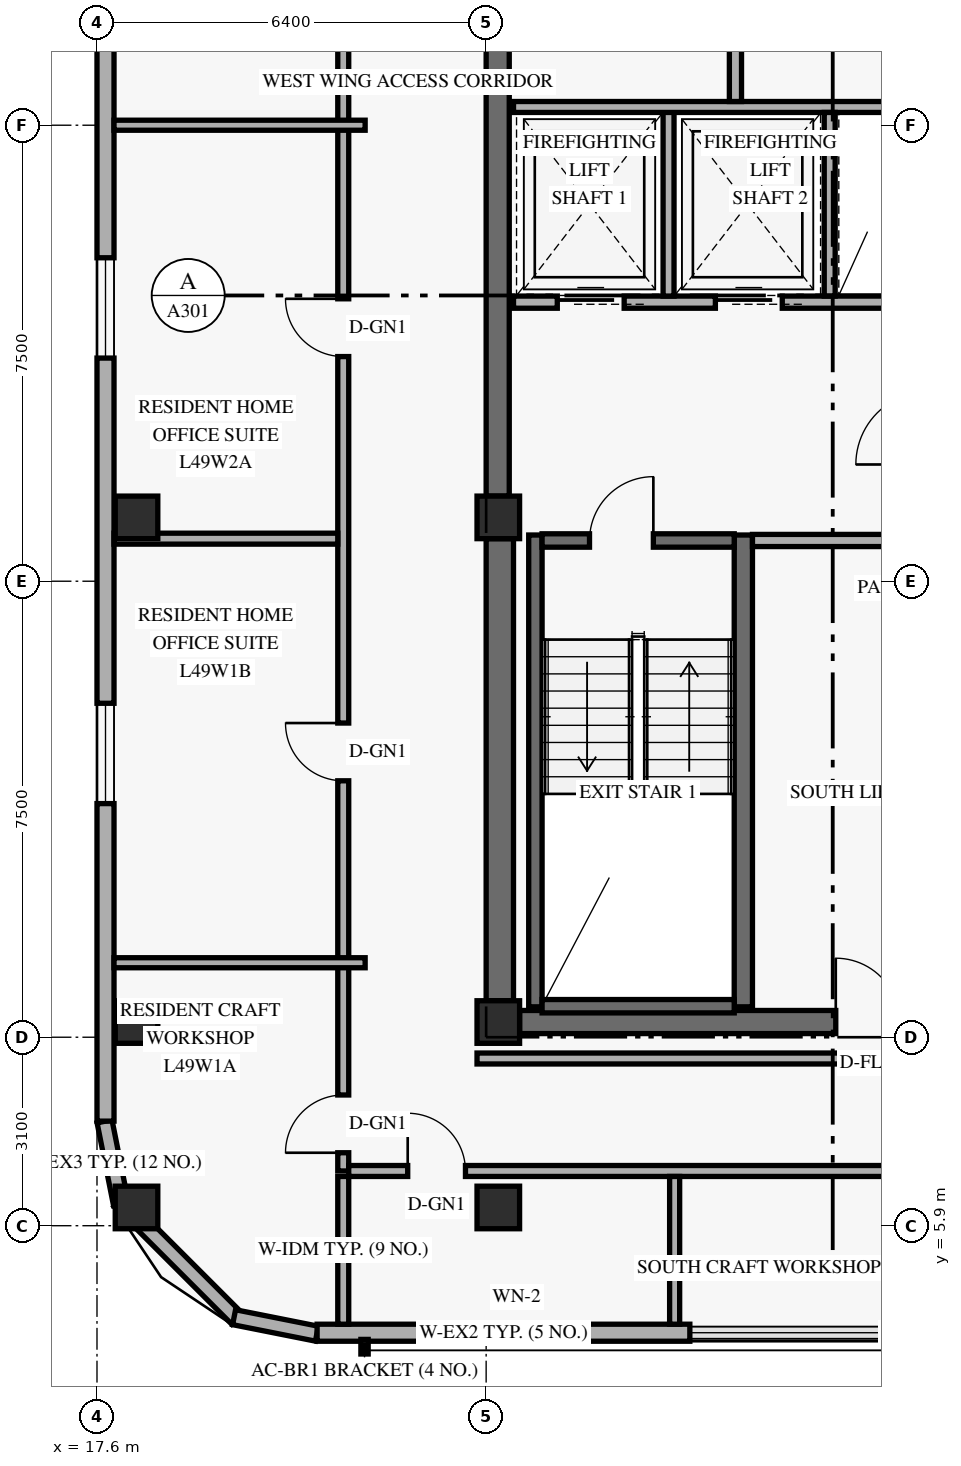
"""IFC4 building model, lengths in metres.
Left out: names, types, materials, properties, quantities, classifications, styles, units other than length and angle.
Written with IfcOpenShell. Run it as: python <this file> out.ifc"""

import sys

from ifc_helpers import new_model, si_unit, direction, frame, frame_2d, origin, origin_2d, place, context, subcontext, project, spatial, rectangle, extrude, element, fill, save


model = new_model("IFC4")
c1 = context("Model", 3, precision=1e-05, world=origin(), true_north=direction((0.0, 1.0)))
c2 = subcontext(c1, "Body", "Model", "MODEL_VIEW")
j1 = project(units=[si_unit("LENGTHUNIT", "METRE"), si_unit("PLANEANGLEUNIT", "RADIAN")], contexts=[c1])
p1 = place(None, origin())
s1 = spatial("IfcSite", under=j1, at=p1, CompositionType="ELEMENT")
p2 = place(p1, origin())
s2 = spatial("IfcBuilding", under=s1, at=p2, CompositionType="ELEMENT")
p3 = place(p2, frame((0.0, 0.0, 188.4)))
s3 = spatial("IfcBuildingStorey", under=s2, at=p3, CompositionType="ELEMENT", Elevation=188.4)
p4 = place(p3, frame((24.225, 9.6, 0.0), z_axis=(0.0, 0.0, 1.0), x_axis=(0.0, 1.0, 0.0)))
e1 = element("IfcWall", 1, at=p4, inside=s3, PredefinedType="SHEAR", context=c2, shape_type="SweptSolid", body=[
    extrude(rectangle(XDim=7.6, YDim=0.45, at=frame_2d((3.8, 0.0))), origin(), (0.0, 0.0, 1.0), 2.738),
])
p5 = place(p3, frame((24.19, 17.9, 0.0), z_axis=(0.0, 0.0, 1.0), x_axis=(0.0, 1.0, 0.0)))
e2 = element("IfcWall", 2, at=p5, inside=s3, PredefinedType="SHEAR", context=c2, shape_type="SweptSolid", body=[
    extrude(rectangle(XDim=11.95, YDim=0.38, at=frame_2d((5.975, 0.0))), origin(), (0.0, 0.0, 1.0), 2.738),
])
p6 = place(p3, frame((24.55, 9.25, 0.0), z_axis=(0.0, 0.0, 1.0), x_axis=(1.0, 0.0, 0.0)))
e3 = element("IfcWall", 3, at=p6, inside=s3, PredefinedType="SHEAR", context=c2, shape_type="SweptSolid", body=[
    extrude(rectangle(XDim=10.3, YDim=0.38, at=frame_2d((5.15, 0.0))), origin(), (0.0, 0.0, 1.0), 3.35),
])
p7 = place(p6, frame((5.2, 0.0, 0.0)))
e4 = element("IfcOpeningElement", 4, at=p7, cuts=e3, PredefinedType="OPENING", context=c2, shape_type="SweptSolid", body=[
    extrude(rectangle(XDim=1.05, YDim=2.15, at=frame_2d((0.525, 1.075))), frame((0.0, 0.2, 0.0), z_axis=(0.0, -1.0, 0.0), x_axis=(1.0, 0.0, 0.0)), (0.0, 0.0, 1.0), 0.4),
])
p8 = place(p3, frame((24.81, 9.5, 0.0), z_axis=(0.0, 0.0, 1.0), x_axis=(0.0, 1.0, 0.0)))
e5 = element("IfcWall", 5, at=p8, inside=s3, PredefinedType="SHEAR", context=c2, shape_type="SweptSolid", body=[
    extrude(rectangle(XDim=7.76, YDim=0.22, at=frame_2d((3.88, 0.0))), origin(), (0.0, 0.0, 1.0), 3.35),
])
p9 = place(p3, frame((28.23, 9.5, 0.0), z_axis=(0.0, 0.0, 1.0), x_axis=(0.0, 1.0, 0.0)))
e6 = element("IfcWall", 6, at=p9, inside=s3, PredefinedType="SHEAR", context=c2, shape_type="SweptSolid", body=[
    extrude(rectangle(XDim=7.76, YDim=0.3, at=frame_2d((3.88, 0.0))), origin(), (0.0, 0.0, 1.0), 3.35),
])
p10 = place(p3, frame((24.92, 9.51, 0.0), z_axis=(0.0, 0.0, 1.0), x_axis=(1.0, 0.0, 0.0)))
e7 = element("IfcWall", 7, at=p10, inside=s3, PredefinedType="SHEAR", context=c2, shape_type="SweptSolid", body=[
    extrude(rectangle(XDim=3.16, YDim=0.22, at=frame_2d((1.58, 0.0))), origin(), (0.0, 0.0, 1.0), 3.35),
])
p11 = place(p3, frame((24.92, 17.17, 0.0), z_axis=(0.0, 0.0, 1.0), x_axis=(1.0, 0.0, 0.0)))
e8 = element("IfcWall", 8, at=p11, inside=s3, PredefinedType="SHEAR", context=c2, shape_type="SweptSolid", body=[
    extrude(rectangle(XDim=3.16, YDim=0.22, at=frame_2d((1.58, 0.0))), origin(), (0.0, 0.0, 1.0), 3.35),
])
p12 = place(p11, frame((0.78, 0.0, 0.0)))
e9 = element("IfcOpeningElement", 9, at=p12, cuts=e8, PredefinedType="OPENING", context=c2, shape_type="SweptSolid", body=[
    extrude(rectangle(XDim=1.05, YDim=2.15, at=frame_2d((0.525, 1.075))), frame((0.0, 0.12, 0.0), z_axis=(0.0, -1.0, 0.0), x_axis=(1.0, 0.0, 0.0)), (0.0, 0.0, 1.0), 0.24),
])
for number, where, z_axis, x_axis in (
    (10, (18.25, 6.2, 0.0), (0.0, 0.0, 1.0), (1.0, 0.0, 0.0)),
    (11, (18.25, 9.25, 0.0), (0.0, 0.0, 1.0), (1.0, 0.0, 0.0)),
    (12, (18.25, 17.55, 0.0), (0.0, 0.0, 1.0), (1.0, 0.0, 0.0)),
    (13, (24.2, 6.2, 0.0), (0.0, 0.0, 1.0), (1.0, 0.0, 0.0)),
    (14, (24.2, 9.25, 0.0), (0.0, 0.0, 1.0), (1.0, 0.0, 0.0)),
    (15, (24.2, 17.55, 0.0), (0.0, 0.0, 1.0), (1.0, 0.0, 0.0)),
):
    element("IfcColumn", number, at=place(p3, frame(where, z_axis=z_axis, x_axis=x_axis)), inside=s3, PredefinedType="COLUMN", context=c2, shape_type="SweptSolid", body=[
        extrude(rectangle(XDim=0.7, YDim=0.7, at=origin_2d()), origin(), (0.0, 0.0, 1.0), 3.6),
    ])
p13 = place(p3, frame((17.724, 7.616, 0.0), z_axis=(0.0, 0.0, 1.0), x_axis=(0.195135625965, -0.9807762678, 0.0)))
e16 = element("IfcWall", 16, at=p13, inside=s3, PredefinedType="SOLIDWALL", context=c2, shape_type="SweptSolid", body=[
    extrude(rectangle(XDim=1.389, YDim=0.25, at=frame_2d((0.694, 0.0))), origin(), (0.0, 0.0, 1.0), 3.35),
])
p14 = place(p3, frame((17.968, 6.305, 0.0), z_axis=(0.0, 0.0, 1.0), x_axis=(0.707106781187, -0.707106781187, 0.0)))
e17 = element("IfcWall", 17, at=p14, inside=s3, PredefinedType="SOLIDWALL", context=c2, shape_type="SweptSolid", body=[
    extrude(rectangle(XDim=2.739, YDim=0.25, at=frame_2d((1.37, 0.0))), origin(), (0.0, 0.0, 1.0), 3.35),
])
p15 = place(p3, frame((19.854, 4.395, 0.0), z_axis=(0.0, 0.0, 1.0), x_axis=(0.980809899341, -0.19496651342, 0.0)))
e18 = element("IfcWall", 18, at=p15, inside=s3, PredefinedType="SOLIDWALL", context=c2, shape_type="SweptSolid", body=[
    extrude(rectangle(XDim=1.389, YDim=0.25, at=frame_2d((0.694, 0.0))), origin(), (0.0, 0.0, 1.0), 3.35),
])
p16 = place(p3, frame((21.22, 4.14, 0.0), z_axis=(0.0, 0.0, 1.0), x_axis=(1.0, 0.0, 0.0)))
e19 = element("IfcWall", 19, at=p16, inside=s3, PredefinedType="SOLIDWALL", context=c2, shape_type="SweptSolid", body=[
    extrude(rectangle(XDim=6.13, YDim=0.28, at=frame_2d((3.065, 0.0))), origin(), (0.0, 0.0, 1.0), 3.35),
])
p17 = place(p16, frame((2.53, 0.0, 0.85)))
e20 = element("IfcOpeningElement", 20, at=p17, cuts=e19, PredefinedType="OPENING", context=c2, shape_type="SweptSolid", body=[
    extrude(rectangle(XDim=1.5, YDim=1.55, at=frame_2d((0.75, 0.775))), frame((0.0, 0.15, 0.0), z_axis=(0.0, -1.0, 0.0), x_axis=(1.0, 0.0, 0.0)), (0.0, 0.0, 1.0), 0.3),
])
p18 = place(p3, frame((17.74, 40.38, 0.0), z_axis=(0.0, 0.0, 1.0), x_axis=(0.0, -1.0, 0.0)))
e21 = element("IfcWall", 21, at=p18, inside=s3, PredefinedType="SOLIDWALL", context=c2, shape_type="SweptSolid", body=[
    extrude(rectangle(XDim=32.76, YDim=0.28, at=frame_2d((16.38, 0.0))), origin(), (0.0, 0.0, 1.0), 3.35),
])
p19 = place(p18, frame((25.887, 0.0, 0.85)))
e22 = element("IfcOpeningElement", 22, at=p19, cuts=e21, PredefinedType="OPENING", context=c2, shape_type="SweptSolid", body=[
    extrude(rectangle(XDim=1.65, YDim=1.6, at=frame_2d((0.825, 0.8))), frame((0.0, 0.15, 0.0), z_axis=(0.0, -1.0, 0.0), x_axis=(1.0, 0.0, 0.0)), (0.0, 0.0, 1.0), 0.3),
])
p20 = place(p18, frame((18.56, 0.0, 0.85)))
e23 = element("IfcOpeningElement", 23, at=p20, cuts=e21, PredefinedType="OPENING", context=c2, shape_type="SweptSolid", body=[
    extrude(rectangle(XDim=1.65, YDim=1.6, at=frame_2d((0.825, 0.8))), frame((0.0, 0.15, 0.0), z_axis=(0.0, -1.0, 0.0), x_axis=(1.0, 0.0, 0.0)), (0.0, 0.0, 1.0), 0.3),
])
p21 = place(p18, frame((12.675, 0.0, 0.85)))
e24 = element("IfcOpeningElement", 24, at=p21, cuts=e21, PredefinedType="OPENING", context=c2, shape_type="SweptSolid", body=[
    extrude(rectangle(XDim=1.65, YDim=1.6, at=frame_2d((0.825, 0.8))), frame((0.0, 0.15, 0.0), z_axis=(0.0, -1.0, 0.0), x_axis=(1.0, 0.0, 0.0)), (0.0, 0.0, 1.0), 0.3),
])
p22 = place(p18, frame((5.268, 0.0, 0.85)))
e25 = element("IfcOpeningElement", 25, at=p22, cuts=e21, PredefinedType="OPENING", context=c2, shape_type="SweptSolid", body=[
    extrude(rectangle(XDim=1.65, YDim=1.6, at=frame_2d((0.825, 0.8))), frame((0.0, 0.15, 0.0), z_axis=(0.0, -1.0, 0.0), x_axis=(1.0, 0.0, 0.0)), (0.0, 0.0, 1.0), 0.3),
])
p23 = place(p3, frame((24.45, 21.09, 0.0), z_axis=(0.0, 0.0, 1.0), x_axis=(1.0, 0.0, 0.0)))
e26 = element("IfcWall", 26, at=p23, inside=s3, PredefinedType="STANDARD", context=c2, shape_type="SweptSolid", body=[
    extrude(rectangle(XDim=6.83, YDim=0.2, at=frame_2d((3.415, 0.0))), origin(), (0.0, 0.0, 1.0), 3.35),
])
p24 = place(p23, frame((0.72, 0.0, 0.0)))
e27 = element("IfcOpeningElement", 27, at=p24, cuts=e26, PredefinedType="OPENING", context=c2, shape_type="SweptSolid", body=[
    extrude(rectangle(XDim=1.1, YDim=2.2, at=frame_2d((0.55, 1.1))), frame((0.0, 0.11, 0.0), z_axis=(0.0, -1.0, 0.0), x_axis=(1.0, 0.0, 0.0)), (0.0, 0.0, 1.0), 0.22),
])
p25 = place(p23, frame((3.32, 0.0, 0.0)))
e28 = element("IfcOpeningElement", 28, at=p25, cuts=e26, PredefinedType="OPENING", context=c2, shape_type="SweptSolid", body=[
    extrude(rectangle(XDim=1.1, YDim=2.2, at=frame_2d((0.55, 1.1))), frame((0.0, 0.11, 0.0), z_axis=(0.0, -1.0, 0.0), x_axis=(1.0, 0.0, 0.0)), (0.0, 0.0, 1.0), 0.22),
])
p26 = place(p3, frame((28.38, 17.17, 0.0), z_axis=(0.0, 0.0, 1.0), x_axis=(1.0, 0.0, 0.0)))
e29 = element("IfcWall", 29, at=p26, inside=s3, PredefinedType="STANDARD", context=c2, shape_type="SweptSolid", body=[
    extrude(rectangle(XDim=2.9, YDim=0.2, at=frame_2d((1.45, 0.0))), origin(), (0.0, 0.0, 1.0), 3.35),
])
p27 = place(p3, frame((27.0, 21.19, 0.0), z_axis=(0.0, 0.0, 1.0), x_axis=(0.0, 1.0, 0.0)))
e30 = element("IfcWall", 30, at=p27, inside=s3, PredefinedType="STANDARD", context=c2, shape_type="SweptSolid", body=[
    extrude(rectangle(XDim=3.11, YDim=0.18, at=frame_2d((1.555, 0.0))), origin(), (0.0, 0.0, 1.0), 3.35),
])
p28 = place(p3, frame((24.45, 24.3, 0.0), z_axis=(0.0, 0.0, 1.0), x_axis=(1.0, 0.0, 0.0)))
e31 = element("IfcWall", 31, at=p28, inside=s3, PredefinedType="STANDARD", context=c2, shape_type="SweptSolid", body=[
    extrude(rectangle(XDim=6.83, YDim=0.18, at=frame_2d((3.415, 0.0))), origin(), (0.0, 0.0, 1.0), 3.35),
])
p29 = place(p3, frame((29.65, 21.19, 0.0), z_axis=(0.0, 0.0, 1.0), x_axis=(0.0, 1.0, 0.0)))
e32 = element("IfcWall", 32, at=p29, inside=s3, PredefinedType="STANDARD", context=c2, shape_type="SweptSolid", body=[
    extrude(rectangle(XDim=3.02, YDim=0.18, at=frame_2d((1.51, 0.0))), origin(), (0.0, 0.0, 1.0), 3.35),
])
p30 = place(p3, frame((28.1, 24.39, 0.0), z_axis=(0.0, 0.0, 1.0), x_axis=(0.0, 1.0, 0.0)))
e33 = element("IfcWall", 33, at=p30, inside=s3, PredefinedType="STANDARD", context=c2, shape_type="SweptSolid", body=[
    extrude(rectangle(XDim=4.75, YDim=0.2, at=frame_2d((2.375, 0.0))), origin(), (0.0, 0.0, 1.0), 3.35),
])
p31 = place(p30, frame((1.86, 0.0, 0.0)))
e34 = element("IfcOpeningElement", 34, at=p31, cuts=e33, PredefinedType="OPENING", context=c2, shape_type="SweptSolid", body=[
    extrude(rectangle(XDim=0.9, YDim=2.1, at=frame_2d((0.45, 1.05))), frame((0.0, 0.11, 0.0), z_axis=(0.0, -1.0, 0.0), x_axis=(1.0, 0.0, 0.0)), (0.0, 0.0, 1.0), 0.22),
])
p32 = place(p3, frame((21.65, 6.8, 0.0), z_axis=(0.0, 0.0, 1.0), x_axis=(0.0, 1.0, 0.0)))
e35 = element("IfcWall", 35, at=p32, inside=s3, PredefinedType="STANDARD", context=c2, shape_type="SweptSolid", body=[
    extrude(rectangle(XDim=34.4, YDim=0.18, at=frame_2d((17.2, 0.0))), origin(), (0.0, 0.0, 1.0), 2.72),
])
p33 = place(p32, frame((0.3, 0.0, 0.0)))
e36 = element("IfcOpeningElement", 36, at=p33, cuts=e35, PredefinedType="OPENING", context=c2, shape_type="SweptSolid", body=[
    extrude(rectangle(XDim=0.95, YDim=2.15, at=frame_2d((0.475, 1.075))), frame((0.0, 0.1, 0.0), z_axis=(0.0, -1.0, 0.0), x_axis=(1.0, 0.0, 0.0)), (0.0, 0.0, 1.0), 0.2),
])
p34 = place(p32, frame((6.417, 0.0, 0.0)))
e37 = element("IfcOpeningElement", 37, at=p34, cuts=e35, PredefinedType="OPENING", context=c2, shape_type="SweptSolid", body=[
    extrude(rectangle(XDim=0.95, YDim=2.15, at=frame_2d((0.475, 1.075))), frame((0.0, 0.1, 0.0), z_axis=(0.0, -1.0, 0.0), x_axis=(1.0, 0.0, 0.0)), (0.0, 0.0, 1.0), 0.2),
])
p35 = place(p32, frame((13.395, 0.0, 0.0)))
e38 = element("IfcOpeningElement", 38, at=p35, cuts=e35, PredefinedType="OPENING", context=c2, shape_type="SweptSolid", body=[
    extrude(rectangle(XDim=0.95, YDim=2.15, at=frame_2d((0.475, 1.075))), frame((0.0, 0.1, 0.0), z_axis=(0.0, -1.0, 0.0), x_axis=(1.0, 0.0, 0.0)), (0.0, 0.0, 1.0), 0.2),
])
p36 = place(p32, frame((20.105, 0.0, 0.0)))
e39 = element("IfcOpeningElement", 39, at=p36, cuts=e35, PredefinedType="OPENING", context=c2, shape_type="SweptSolid", body=[
    extrude(rectangle(XDim=0.95, YDim=2.15, at=frame_2d((0.475, 1.075))), frame((0.0, 0.1, 0.0), z_axis=(0.0, -1.0, 0.0), x_axis=(1.0, 0.0, 0.0)), (0.0, 0.0, 1.0), 0.2),
])
p37 = place(p32, frame((27.083, 0.0, 0.0)))
e40 = element("IfcOpeningElement", 40, at=p37, cuts=e35, PredefinedType="OPENING", context=c2, shape_type="SweptSolid", body=[
    extrude(rectangle(XDim=0.95, YDim=2.15, at=frame_2d((0.475, 1.075))), frame((0.0, 0.1, 0.0), z_axis=(0.0, -1.0, 0.0), x_axis=(1.0, 0.0, 0.0)), (0.0, 0.0, 1.0), 0.2),
])
p38 = place(p32, frame((33.19, 0.0, 0.0)))
e41 = element("IfcOpeningElement", 41, at=p38, cuts=e35, PredefinedType="OPENING", context=c2, shape_type="SweptSolid", body=[
    extrude(rectangle(XDim=0.95, YDim=2.15, at=frame_2d((0.475, 1.075))), frame((0.0, 0.1, 0.0), z_axis=(0.0, -1.0, 0.0), x_axis=(1.0, 0.0, 0.0)), (0.0, 0.0, 1.0), 0.2),
])
p39 = place(p3, frame((21.74, 6.8, 0.0), z_axis=(0.0, 0.0, 1.0), x_axis=(1.0, 0.0, 0.0)))
e42 = element("IfcWall", 42, at=p39, inside=s3, PredefinedType="STANDARD", context=c2, shape_type="SweptSolid", body=[
    extrude(rectangle(XDim=13.68, YDim=0.18, at=frame_2d((6.84, 0.0))), origin(), (0.0, 0.0, 1.0), 2.72),
])
p40 = place(p39, frame((0.97, 0.0, 0.0)))
e43 = element("IfcOpeningElement", 43, at=p40, cuts=e42, PredefinedType="OPENING", context=c2, shape_type="SweptSolid", body=[
    extrude(rectangle(XDim=0.95, YDim=2.15, at=frame_2d((0.475, 1.075))), frame((0.0, 0.1, 0.0), z_axis=(0.0, -1.0, 0.0), x_axis=(1.0, 0.0, 0.0)), (0.0, 0.0, 1.0), 0.2),
])
p41 = place(p39, frame((9.11, 0.0, 0.0)))
e44 = element("IfcOpeningElement", 44, at=p41, cuts=e42, PredefinedType="OPENING", context=c2, shape_type="SweptSolid", body=[
    extrude(rectangle(XDim=0.95, YDim=2.15, at=frame_2d((0.475, 1.075))), frame((0.0, 0.1, 0.0), z_axis=(0.0, -1.0, 0.0), x_axis=(1.0, 0.0, 0.0)), (0.0, 0.0, 1.0), 0.2),
])
p42 = place(p3, frame((23.85, 8.65, 0.0), z_axis=(0.0, 0.0, 1.0), x_axis=(1.0, 0.0, 0.0)))
e45 = element("IfcWall", 45, at=p42, inside=s3, PredefinedType="STANDARD", context=c2, shape_type="SweptSolid", body=[
    extrude(rectangle(XDim=11.57, YDim=0.18, at=frame_2d((5.785, 0.0))), origin(), (0.0, 0.0, 1.0), 2.72),
])
p43 = place(p3, frame((21.65, 4.28, 0.0), z_axis=(0.0, 0.0, 1.0), x_axis=(0.0, 1.0, 0.0)))
e46 = element("IfcWall", 46, at=p43, inside=s3, PredefinedType="PARTITIONING", context=c2, shape_type="SweptSolid", body=[
    extrude(rectangle(XDim=2.43, YDim=0.18, at=frame_2d((1.215, 0.0))), origin(), (0.0, 0.0, 1.0), 2.869),
])
p44 = place(p3, frame((17.88, 10.225, 0.0), z_axis=(0.0, 0.0, 1.0), x_axis=(1.0, 0.0, 0.0)))
e47 = element("IfcWall", 47, at=p44, inside=s3, PredefinedType="PARTITIONING", context=c2, shape_type="SweptSolid", body=[
    extrude(rectangle(XDim=4.13, YDim=0.165, at=frame_2d((2.065, 0.0))), origin(), (0.0, 0.0, 1.0), 2.869),
])
p45 = place(p3, frame((17.88, 17.2, 0.0), z_axis=(0.0, 0.0, 1.0), x_axis=(1.0, 0.0, 0.0)))
e48 = element("IfcWall", 48, at=p45, inside=s3, PredefinedType="PARTITIONING", context=c2, shape_type="SweptSolid", body=[
    extrude(rectangle(XDim=3.68, YDim=0.18, at=frame_2d((1.84, 0.0))), origin(), (0.0, 0.0, 1.0), 2.869),
])
p46 = place(p3, frame((17.88, 24.0, 0.0), z_axis=(0.0, 0.0, 1.0), x_axis=(1.0, 0.0, 0.0)))
e49 = element("IfcWall", 49, at=p46, inside=s3, PredefinedType="PARTITIONING", context=c2, shape_type="SweptSolid", body=[
    extrude(rectangle(XDim=4.13, YDim=0.165, at=frame_2d((2.065, 0.0))), origin(), (0.0, 0.0, 1.0), 2.869),
])
p47 = place(p3, frame((27.1, 4.28, 0.0), z_axis=(0.0, 0.0, 1.0), x_axis=(0.0, 1.0, 0.0)))
e50 = element("IfcWall", 50, at=p47, inside=s3, PredefinedType="PARTITIONING", context=c2, shape_type="SweptSolid", body=[
    extrude(rectangle(XDim=2.43, YDim=0.165, at=frame_2d((1.215, 0.0))), origin(), (0.0, 0.0, 1.0), 2.869),
])
p48 = place(p17, origin())
e51 = element("IfcWindow", 51, at=p48, inside=s3, PartitioningType="SINGLE_PANEL", PredefinedType="WINDOW", context=c2, shape_type="SweptSolid", body=[
    extrude(rectangle(XDim=1.5, YDim=1.55, at=frame_2d((0.75, 0.775))), frame((0.0, 0.03, 0.0), z_axis=(0.0, -1.0, 0.0), x_axis=(1.0, 0.0, 0.0)), (0.0, 0.0, 1.0), 0.06),
])
fill(e20, e51)
p49 = place(p19, origin())
e52 = element("IfcWindow", 52, at=p49, inside=s3, PartitioningType="SINGLE_PANEL", PredefinedType="WINDOW", context=c2, shape_type="SweptSolid", body=[
    extrude(rectangle(XDim=1.65, YDim=1.6, at=frame_2d((0.825, 0.8))), frame((0.0, 0.03, 0.0), z_axis=(0.0, -1.0, 0.0), x_axis=(1.0, 0.0, 0.0)), (0.0, 0.0, 1.0), 0.06),
])
fill(e22, e52)
p50 = place(p20, origin())
e53 = element("IfcWindow", 53, at=p50, inside=s3, PartitioningType="SINGLE_PANEL", PredefinedType="WINDOW", context=c2, shape_type="SweptSolid", body=[
    extrude(rectangle(XDim=1.65, YDim=1.6, at=frame_2d((0.825, 0.8))), frame((0.0, 0.03, 0.0), z_axis=(0.0, -1.0, 0.0), x_axis=(1.0, 0.0, 0.0)), (0.0, 0.0, 1.0), 0.06),
])
fill(e23, e53)
p51 = place(p12, frame((1.05, 0.0, 0.0), z_axis=(0.0, 0.0, 1.0), x_axis=(-1.0, 0.0, 0.0)))
e54 = element("IfcDoor", 54, at=p51, inside=s3, OperationType="SINGLE_SWING_LEFT", PredefinedType="DOOR", context=c2, shape_type="SweptSolid", body=[
    extrude(rectangle(XDim=1.05, YDim=2.15, at=frame_2d((0.525, 1.075))), frame((0.0, 0.025, 0.0), z_axis=(0.0, -1.0, 0.0), x_axis=(1.0, 0.0, 0.0)), (0.0, 0.0, 1.0), 0.05),
])
fill(e9, e54)
p52 = place(p24, origin())
e55 = element("IfcDoor", 55, at=p52, inside=s3, OperationType="SLIDING_TO_LEFT", PredefinedType="DOOR", context=c2, shape_type="SweptSolid", body=[
    extrude(rectangle(XDim=1.1, YDim=2.2, at=frame_2d((0.55, 1.1))), frame((0.0, 0.025, 0.0), z_axis=(0.0, -1.0, 0.0), x_axis=(1.0, 0.0, 0.0)), (0.0, 0.0, 1.0), 0.05),
])
fill(e27, e55)
p53 = place(p25, origin())
e56 = element("IfcDoor", 56, at=p53, inside=s3, OperationType="SLIDING_TO_LEFT", PredefinedType="DOOR", context=c2, shape_type="SweptSolid", body=[
    extrude(rectangle(XDim=1.1, YDim=2.2, at=frame_2d((0.55, 1.1))), frame((0.0, 0.025, 0.0), z_axis=(0.0, -1.0, 0.0), x_axis=(1.0, 0.0, 0.0)), (0.0, 0.0, 1.0), 0.05),
])
fill(e28, e56)
p54 = place(p7, origin())
e57 = element("IfcDoor", 57, at=p54, inside=s3, OperationType="SINGLE_SWING_LEFT", PredefinedType="DOOR", context=c2, shape_type="SweptSolid", body=[
    extrude(rectangle(XDim=1.05, YDim=2.15, at=frame_2d((0.525, 1.075))), frame((0.0, 0.025, 0.0), z_axis=(0.0, -1.0, 0.0), x_axis=(1.0, 0.0, 0.0)), (0.0, 0.0, 1.0), 0.05),
])
fill(e4, e57)
p55 = place(p33, origin())
e58 = element("IfcDoor", 58, at=p55, inside=s3, OperationType="SINGLE_SWING_LEFT", PredefinedType="DOOR", context=c2, shape_type="SweptSolid", body=[
    extrude(rectangle(XDim=0.95, YDim=2.15, at=frame_2d((0.475, 1.075))), frame((0.0, 0.025, 0.0), z_axis=(0.0, -1.0, 0.0), x_axis=(1.0, 0.0, 0.0)), (0.0, 0.0, 1.0), 0.05),
])
fill(e36, e58)
p56 = place(p34, origin())
e59 = element("IfcDoor", 59, at=p56, inside=s3, OperationType="SINGLE_SWING_RIGHT", PredefinedType="DOOR", context=c2, shape_type="SweptSolid", body=[
    extrude(rectangle(XDim=0.95, YDim=2.15, at=frame_2d((0.475, 1.075))), frame((0.0, 0.025, 0.0), z_axis=(0.0, -1.0, 0.0), x_axis=(1.0, 0.0, 0.0)), (0.0, 0.0, 1.0), 0.05),
])
fill(e37, e59)
p57 = place(p35, origin())
e60 = element("IfcDoor", 60, at=p57, inside=s3, OperationType="SINGLE_SWING_RIGHT", PredefinedType="DOOR", context=c2, shape_type="SweptSolid", body=[
    extrude(rectangle(XDim=0.95, YDim=2.15, at=frame_2d((0.475, 1.075))), frame((0.0, 0.025, 0.0), z_axis=(0.0, -1.0, 0.0), x_axis=(1.0, 0.0, 0.0)), (0.0, 0.0, 1.0), 0.05),
])
fill(e38, e60)
p58 = place(p40, origin())
e61 = element("IfcDoor", 61, at=p58, inside=s3, OperationType="SINGLE_SWING_LEFT", PredefinedType="DOOR", context=c2, shape_type="SweptSolid", body=[
    extrude(rectangle(XDim=0.95, YDim=2.15, at=frame_2d((0.475, 1.075))), frame((0.0, 0.025, 0.0), z_axis=(0.0, -1.0, 0.0), x_axis=(1.0, 0.0, 0.0)), (0.0, 0.0, 1.0), 0.05),
])
fill(e43, e61)
save(model, sys.argv[1])
